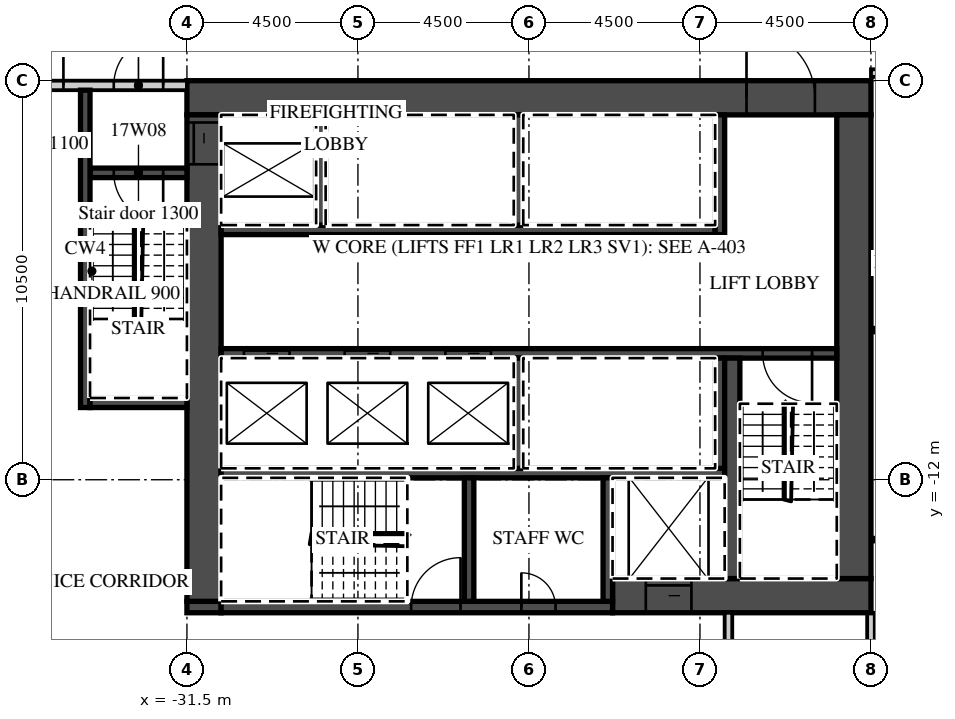
"""IFC4 building model, lengths in metres.
Left out: names, types, materials, properties, quantities, classifications, styles, units other than length and angle.
Written with IfcOpenShell. Run it as: python <this file> out.ifc"""

import sys

from ifc_helpers import new_model, si_unit, direction, frame, frame_2d, origin, place, context, subcontext, project, spatial, rectangle, extrude, element, fill, save


model = new_model("IFC4")
c1 = context("Model", 3, precision=1e-05, world=origin(), true_north=direction((0.0, 1.0)))
c2 = subcontext(c1, "Body", "Model", "MODEL_VIEW")
j1 = project(units=[si_unit("LENGTHUNIT", "METRE"), si_unit("PLANEANGLEUNIT", "RADIAN")], contexts=[c1])
p1 = place(None, origin())
s1 = spatial("IfcSite", under=j1, at=p1, CompositionType="ELEMENT")
p2 = place(p1, origin())
s2 = spatial("IfcBuilding", under=s1, at=p2, CompositionType="ELEMENT")
p3 = place(p2, frame((0.0, 0.0, 86.4)))
s3 = spatial("IfcBuildingStorey", under=s2, at=p3, CompositionType="ELEMENT", Elevation=86.4)
p4 = place(p3, frame((-13.5, -21.55, 0.0), z_axis=(0.0, 0.0, 1.0), x_axis=(0.0, 1.0, 0.0)))
e1 = element("IfcWall", 1, at=p4, inside=s3, PredefinedType="PARTITIONING", context=c2, shape_type="SweptSolid", body=[
    extrude(rectangle(XDim=6.05, YDim=0.2, at=frame_2d((3.025, 0.0))), origin(), (0.0, 0.0, 1.0), 3.02),
])
p5 = place(p3, frame((-13.5, -1.3, 0.0), z_axis=(0.0, 0.0, 1.0), x_axis=(1.0, 0.0, 0.0)))
e2 = element("IfcWall", 2, at=p5, inside=s3, PredefinedType="PARTITIONING", context=c2, shape_type="SweptSolid", body=[
    extrude(rectangle(XDim=58.05, YDim=0.2, at=frame_2d((29.025, 0.0))), origin(), (0.0, 0.0, 1.0), 3.02),
])
p6 = place(p5, frame((2.925, 0.0, 0.0)))
e3 = element("IfcOpeningElement", 3, at=p6, cuts=e2, PredefinedType="OPENING", context=c2, shape_type="SweptSolid", body=[
    extrude(rectangle(XDim=1.0, YDim=2.1, at=frame_2d((0.5, 1.05))), frame((0.0, 0.11, 0.0), z_axis=(0.0, -1.0, 0.0), x_axis=(1.0, 0.0, 0.0)), (0.0, 0.0, 1.0), 0.22),
])
p7 = place(p5, frame((5.075, 0.0, 0.0)))
e4 = element("IfcOpeningElement", 4, at=p7, cuts=e2, PredefinedType="OPENING", context=c2, shape_type="SweptSolid", body=[
    extrude(rectangle(XDim=1.0, YDim=2.1, at=frame_2d((0.5, 1.05))), frame((0.0, 0.11, 0.0), z_axis=(0.0, -1.0, 0.0), x_axis=(1.0, 0.0, 0.0)), (0.0, 0.0, 1.0), 0.22),
])
p8 = place(p5, frame((9.55, 0.0, 0.0)))
e5 = element("IfcOpeningElement", 5, at=p8, cuts=e2, PredefinedType="OPENING", context=c2, shape_type="SweptSolid", body=[
    extrude(rectangle(XDim=1.0, YDim=2.1, at=frame_2d((0.5, 1.05))), frame((0.0, 0.11, 0.0), z_axis=(0.0, -1.0, 0.0), x_axis=(1.0, 0.0, 0.0)), (0.0, 0.0, 1.0), 0.22),
])
p9 = place(p5, frame((14.075, 0.0, 0.0)))
e6 = element("IfcOpeningElement", 6, at=p9, cuts=e2, PredefinedType="OPENING", context=c2, shape_type="SweptSolid", body=[
    extrude(rectangle(XDim=1.0, YDim=2.1, at=frame_2d((0.5, 1.05))), frame((0.0, 0.11, 0.0), z_axis=(0.0, -1.0, 0.0), x_axis=(1.0, 0.0, 0.0)), (0.0, 0.0, 1.0), 0.22),
])
p10 = place(p5, frame((20.925, 0.0, 0.0)))
e7 = element("IfcOpeningElement", 7, at=p10, cuts=e2, PredefinedType="OPENING", context=c2, shape_type="SweptSolid", body=[
    extrude(rectangle(XDim=1.0, YDim=2.1, at=frame_2d((0.5, 1.05))), frame((0.0, 0.11, 0.0), z_axis=(0.0, -1.0, 0.0), x_axis=(1.0, 0.0, 0.0)), (0.0, 0.0, 1.0), 0.22),
])
p11 = place(p5, frame((27.862, 0.0, 0.0)))
e8 = element("IfcOpeningElement", 8, at=p11, cuts=e2, PredefinedType="OPENING", context=c2, shape_type="SweptSolid", body=[
    extrude(rectangle(XDim=1.2, YDim=2.1, at=frame_2d((0.6, 1.05))), frame((0.0, 0.11, 0.0), z_axis=(0.0, -1.0, 0.0), x_axis=(1.0, 0.0, 0.0)), (0.0, 0.0, 1.0), 0.22),
])
p12 = place(p5, frame((34.45, 0.0, 0.0)))
e9 = element("IfcOpeningElement", 9, at=p12, cuts=e2, PredefinedType="OPENING", context=c2, shape_type="SweptSolid", body=[
    extrude(rectangle(XDim=1.0, YDim=2.1, at=frame_2d((0.5, 1.05))), frame((0.0, 0.11, 0.0), z_axis=(0.0, -1.0, 0.0), x_axis=(1.0, 0.0, 0.0)), (0.0, 0.0, 1.0), 0.22),
])
p13 = place(p5, frame((38.925, 0.0, 0.0)))
e10 = element("IfcOpeningElement", 10, at=p13, cuts=e2, PredefinedType="OPENING", context=c2, shape_type="SweptSolid", body=[
    extrude(rectangle(XDim=1.0, YDim=2.1, at=frame_2d((0.5, 1.05))), frame((0.0, 0.11, 0.0), z_axis=(0.0, -1.0, 0.0), x_axis=(1.0, 0.0, 0.0)), (0.0, 0.0, 1.0), 0.22),
])
p14 = place(p5, frame((41.075, 0.0, 0.0)))
e11 = element("IfcOpeningElement", 11, at=p14, cuts=e2, PredefinedType="OPENING", context=c2, shape_type="SweptSolid", body=[
    extrude(rectangle(XDim=1.0, YDim=2.1, at=frame_2d((0.5, 1.05))), frame((0.0, 0.11, 0.0), z_axis=(0.0, -1.0, 0.0), x_axis=(1.0, 0.0, 0.0)), (0.0, 0.0, 1.0), 0.22),
])
p15 = place(p5, frame((45.55, 0.0, 0.0)))
e12 = element("IfcOpeningElement", 12, at=p15, cuts=e2, PredefinedType="OPENING", context=c2, shape_type="SweptSolid", body=[
    extrude(rectangle(XDim=1.0, YDim=2.1, at=frame_2d((0.5, 1.05))), frame((0.0, 0.11, 0.0), z_axis=(0.0, -1.0, 0.0), x_axis=(1.0, 0.0, 0.0)), (0.0, 0.0, 1.0), 0.22),
])
p16 = place(p5, frame((50.075, 0.0, 0.0)))
e13 = element("IfcOpeningElement", 13, at=p16, cuts=e2, PredefinedType="OPENING", context=c2, shape_type="SweptSolid", body=[
    extrude(rectangle(XDim=1.0, YDim=2.1, at=frame_2d((0.5, 1.05))), frame((0.0, 0.11, 0.0), z_axis=(0.0, -1.0, 0.0), x_axis=(1.0, 0.0, 0.0)), (0.0, 0.0, 1.0), 0.22),
])
p17 = place(p5, frame((56.525, 0.0, 0.0)))
e14 = element("IfcOpeningElement", 14, at=p17, cuts=e2, PredefinedType="OPENING", context=c2, shape_type="SweptSolid", body=[
    extrude(rectangle(XDim=1.0, YDim=2.1, at=frame_2d((0.5, 1.05))), frame((0.0, 0.11, 0.0), z_axis=(0.0, -1.0, 0.0), x_axis=(1.0, 0.0, 0.0)), (0.0, 0.0, 1.0), 0.22),
])
p18 = place(p3, frame((-31.5, -1.95, 0.0), z_axis=(0.0, 0.0, 1.0), x_axis=(1.0, 0.0, 0.0)))
e15 = element("IfcWall", 15, at=p18, inside=s3, PredefinedType="SHEAR", context=c2, shape_type="SweptSolid", body=[
    extrude(rectangle(XDim=18.0, YDim=0.9, at=frame_2d((9.0, 0.0))), origin(), (0.0, 0.0, 1.0), 3.02),
])
p19 = place(p18, frame((14.725, 0.0, 0.0)))
e16 = element("IfcOpeningElement", 16, at=p19, cuts=e15, PredefinedType="OPENING", context=c2, shape_type="SweptSolid", body=[
    extrude(rectangle(XDim=1.8, YDim=2.1, at=frame_2d((0.9, 1.05))), frame((0.0, 0.46, 0.0), z_axis=(0.0, -1.0, 0.0), x_axis=(1.0, 0.0, 0.0)), (0.0, 0.0, 1.0), 0.92),
])
p20 = place(p3, frame((-20.3, -15.05, 0.0), z_axis=(0.0, 0.0, 1.0), x_axis=(1.0, 0.0, 0.0)))
e17 = element("IfcWall", 17, at=p20, inside=s3, PredefinedType="SHEAR", context=c2, shape_type="SweptSolid", body=[
    extrude(rectangle(XDim=6.8, YDim=0.9, at=frame_2d((3.4, 0.0))), origin(), (0.0, 0.0, 1.0), 3.02),
])
p21 = place(p20, frame((0.875, 0.0, 0.0)))
e18 = element("IfcOpeningElement", 18, at=p21, cuts=e17, PredefinedType="OPENING", context=c2, shape_type="SweptSolid", body=[
    extrude(rectangle(XDim=1.2, YDim=2.1, at=frame_2d((0.6, 1.05))), frame((0.0, 0.46, 0.0), z_axis=(0.0, -1.0, 0.0), x_axis=(1.0, 0.0, 0.0)), (0.0, 0.0, 1.0), 0.92),
])
p22 = place(p3, frame((-31.5, -15.35, 0.0), z_axis=(0.0, 0.0, 1.0), x_axis=(1.0, 0.0, 0.0)))
e19 = element("IfcWall", 19, at=p22, inside=s3, PredefinedType="SHEAR", context=c2, shape_type="SweptSolid", body=[
    extrude(rectangle(XDim=0.9, YDim=0.3, at=frame_2d((0.45, 0.0))), origin(), (0.0, 0.0, 1.0), 3.02),
])
p23 = place(p3, frame((-30.6, -15.35, 0.0), z_axis=(0.0, 0.0, 1.0), x_axis=(1.0, 0.0, 0.0)))
e20 = element("IfcWall", 20, at=p23, inside=s3, PredefinedType="SHEAR", context=c2, shape_type="SweptSolid", body=[
    extrude(rectangle(XDim=10.3, YDim=0.3, at=frame_2d((5.15, 0.0))), origin(), (0.0, 0.0, 1.0), 3.02),
])
p24 = place(p23, frame((5.0, 0.0, 0.0)))
e21 = element("IfcOpeningElement", 21, at=p24, cuts=e20, PredefinedType="OPENING", context=c2, shape_type="SweptSolid", body=[
    extrude(rectangle(XDim=1.3, YDim=2.1, at=frame_2d((0.65, 1.05))), frame((0.0, 0.16, 0.0), z_axis=(0.0, -1.0, 0.0), x_axis=(1.0, 0.0, 0.0)), (0.0, 0.0, 1.0), 0.32),
])
p25 = place(p23, frame((7.9, 0.0, 0.0)))
e22 = element("IfcOpeningElement", 22, at=p25, cuts=e20, PredefinedType="OPENING", context=c2, shape_type="SweptSolid", body=[
    extrude(rectangle(XDim=0.9, YDim=2.1, at=frame_2d((0.45, 1.05))), frame((0.0, 0.16, 0.0), z_axis=(0.0, -1.0, 0.0), x_axis=(1.0, 0.0, 0.0)), (0.0, 0.0, 1.0), 0.32),
])
p26 = place(p3, frame((-31.05, -15.2, 0.0), z_axis=(0.0, 0.0, 1.0), x_axis=(0.0, 1.0, 0.0)))
e23 = element("IfcWall", 23, at=p26, inside=s3, PredefinedType="SHEAR", context=c2, shape_type="SweptSolid", body=[
    extrude(rectangle(XDim=12.8, YDim=0.9, at=frame_2d((6.4, 0.0))), origin(), (0.0, 0.0, 1.0), 3.02),
])
p27 = place(p26, frame((11.5, 0.0, 0.0)))
e24 = element("IfcOpeningElement", 24, at=p27, cuts=e23, PredefinedType="OPENING", context=c2, shape_type="SweptSolid", body=[
    extrude(rectangle(XDim=1.1, YDim=2.1, at=frame_2d((0.55, 1.05))), frame((0.0, 0.46, 0.0), z_axis=(0.0, -1.0, 0.0), x_axis=(1.0, 0.0, 0.0)), (0.0, 0.0, 1.0), 0.92),
])
p28 = place(p3, frame((-13.95, -14.6, 0.0), z_axis=(0.0, 0.0, 1.0), x_axis=(0.0, 1.0, 0.0)))
e25 = element("IfcWall", 25, at=p28, inside=s3, PredefinedType="SHEAR", context=c2, shape_type="SweptSolid", body=[
    extrude(rectangle(XDim=12.2, YDim=0.9, at=frame_2d((6.1, 0.0))), origin(), (0.0, 0.0, 1.0), 3.02),
])
p29 = place(p3, frame((-30.6, -5.425, 0.0), z_axis=(0.0, 0.0, 1.0), x_axis=(1.0, 0.0, 0.0)))
e26 = element("IfcWall", 26, at=p29, inside=s3, PredefinedType="SHEAR", context=c2, shape_type="SweptSolid", body=[
    extrude(rectangle(XDim=13.0, YDim=0.25, at=frame_2d((6.5, 0.0))), origin(), (0.0, 0.0, 1.0), 3.02),
])
p30 = place(p3, frame((-17.475, -5.55, 0.0), z_axis=(0.0, 0.0, 1.0), x_axis=(0.0, 1.0, 0.0)))
e27 = element("IfcWall", 27, at=p30, inside=s3, PredefinedType="SHEAR", context=c2, shape_type="SweptSolid", body=[
    extrude(rectangle(XDim=3.15, YDim=0.25, at=frame_2d((1.575, 0.0))), origin(), (0.0, 0.0, 1.0), 3.02),
])
for number, where, z_axis, x_axis in (
    (28, (-27.975, -5.3, 0.0), (0.0, 0.0, 1.0), (0.0, 1.0, 0.0)),
    (29, (-22.775, -5.3, 0.0), (0.0, 0.0, 1.0), (0.0, 1.0, 0.0)),
):
    element("IfcWall", number, at=place(p3, frame(where, z_axis=z_axis, x_axis=x_axis)), inside=s3, PredefinedType="SHEAR", context=c2, shape_type="SweptSolid", body=[
        extrude(rectangle(XDim=2.9, YDim=0.25, at=frame_2d((1.45, 0.0))), origin(), (0.0, 0.0, 1.0), 3.02),
    ])
p31 = place(p3, frame((-30.6, -8.675, 0.0), z_axis=(0.0, 0.0, 1.0), x_axis=(1.0, 0.0, 0.0)))
e30 = element("IfcWall", 30, at=p31, inside=s3, PredefinedType="SHEAR", context=c2, shape_type="SweptSolid", body=[
    extrude(rectangle(XDim=16.2, YDim=0.25, at=frame_2d((8.1, 0.0))), origin(), (0.0, 0.0, 1.0), 3.02),
])
p32 = place(p31, frame((0.6, 0.0, 0.0)))
e31 = element("IfcOpeningElement", 31, at=p32, cuts=e30, PredefinedType="OPENING", context=c2, shape_type="SweptSolid", body=[
    extrude(rectangle(XDim=1.2, YDim=2.1, at=frame_2d((0.6, 1.05))), frame((0.0, 0.135, 0.0), z_axis=(0.0, -1.0, 0.0), x_axis=(1.0, 0.0, 0.0)), (0.0, 0.0, 1.0), 0.27),
])
p33 = place(p31, frame((3.25, 0.0, 0.0)))
e32 = element("IfcOpeningElement", 32, at=p33, cuts=e30, PredefinedType="OPENING", context=c2, shape_type="SweptSolid", body=[
    extrude(rectangle(XDim=1.2, YDim=2.1, at=frame_2d((0.6, 1.05))), frame((0.0, 0.135, 0.0), z_axis=(0.0, -1.0, 0.0), x_axis=(1.0, 0.0, 0.0)), (0.0, 0.0, 1.0), 0.27),
])
p34 = place(p31, frame((5.9, 0.0, 0.0)))
e33 = element("IfcOpeningElement", 33, at=p34, cuts=e30, PredefinedType="OPENING", context=c2, shape_type="SweptSolid", body=[
    extrude(rectangle(XDim=1.2, YDim=2.1, at=frame_2d((0.6, 1.05))), frame((0.0, 0.135, 0.0), z_axis=(0.0, -1.0, 0.0), x_axis=(1.0, 0.0, 0.0)), (0.0, 0.0, 1.0), 0.27),
])
p35 = place(p31, frame((14.25, 0.0, 0.0)))
e34 = element("IfcOpeningElement", 34, at=p35, cuts=e30, PredefinedType="OPENING", context=c2, shape_type="SweptSolid", body=[
    extrude(rectangle(XDim=1.3, YDim=2.1, at=frame_2d((0.65, 1.05))), frame((0.0, 0.135, 0.0), z_axis=(0.0, -1.0, 0.0), x_axis=(1.0, 0.0, 0.0)), (0.0, 0.0, 1.0), 0.27),
])
p36 = place(p3, frame((-30.6, -11.825, 0.0), z_axis=(0.0, 0.0, 1.0), x_axis=(1.0, 0.0, 0.0)))
e35 = element("IfcWall", 35, at=p36, inside=s3, PredefinedType="SHEAR", context=c2, shape_type="SweptSolid", body=[
    extrude(rectangle(XDim=13.25, YDim=0.25, at=frame_2d((6.625, 0.0))), origin(), (0.0, 0.0, 1.0), 3.02),
])
for number, where, z_axis, x_axis in (
    (36, (-17.475, -11.7, 0.0), (0.0, 0.0, 1.0), (0.0, 1.0, 0.0)),
    (37, (-22.775, -11.7, 0.0), (0.0, 0.0, 1.0), (0.0, 1.0, 0.0)),
):
    element("IfcWall", number, at=place(p3, frame(where, z_axis=z_axis, x_axis=x_axis)), inside=s3, PredefinedType="SHEAR", context=c2, shape_type="SweptSolid", body=[
        extrude(rectangle(XDim=2.9, YDim=0.25, at=frame_2d((1.45, 0.0))), origin(), (0.0, 0.0, 1.0), 3.02),
    ])
p37 = place(p3, frame((-17.15, -14.6, 0.0), z_axis=(0.0, 0.0, 1.0), x_axis=(0.0, 1.0, 0.0)))
e38 = element("IfcWall", 38, at=p37, inside=s3, PredefinedType="SHEAR", context=c2, shape_type="SweptSolid", body=[
    extrude(rectangle(XDim=5.8, YDim=0.4, at=frame_2d((2.9, 0.0))), origin(), (0.0, 0.0, 1.0), 3.02),
])
for number, where, z_axis, x_axis in (
    (39, (-20.425, -15.2, 0.0), (0.0, 0.0, 1.0), (0.0, 1.0, 0.0)),
    (40, (-24.075, -15.2, 0.0), (0.0, 0.0, 1.0), (0.0, 1.0, 0.0)),
):
    element("IfcWall", number, at=place(p3, frame(where, z_axis=z_axis, x_axis=x_axis)), inside=s3, PredefinedType="SHEAR", context=c2, shape_type="SweptSolid", body=[
        extrude(rectangle(XDim=3.25, YDim=0.25, at=frame_2d((1.625, 0.0))), origin(), (0.0, 0.0, 1.0), 3.02),
    ])
p38 = place(p3, frame((-44.55, -1.625, 0.0), z_axis=(0.0, 0.0, 1.0), x_axis=(1.0, 0.0, 0.0)))
e41 = element("IfcWall", 41, at=p38, inside=s3, PredefinedType="PARTITIONING", context=c2, shape_type="SweptSolid", body=[
    extrude(rectangle(XDim=13.05, YDim=0.25, at=frame_2d((6.525, 0.0))), origin(), (0.0, 0.0, 1.0), 3.02),
])
p39 = place(p38, frame((11.125, 0.0, 0.0)))
e42 = element("IfcOpeningElement", 42, at=p39, cuts=e41, PredefinedType="OPENING", context=c2, shape_type="SweptSolid", body=[
    extrude(rectangle(XDim=1.3, YDim=2.1, at=frame_2d((0.65, 1.05))), frame((0.0, 0.135, 0.0), z_axis=(0.0, -1.0, 0.0), x_axis=(1.0, 0.0, 0.0)), (0.0, 0.0, 1.0), 0.27),
])
p40 = place(p38, frame((8.7, 0.0, 0.0)))
e43 = element("IfcOpeningElement", 43, at=p40, cuts=e41, PredefinedType="OPENING", context=c2, shape_type="SweptSolid", body=[
    extrude(rectangle(XDim=1.1, YDim=2.1, at=frame_2d((0.55, 1.05))), frame((0.0, 0.135, 0.0), z_axis=(0.0, -1.0, 0.0), x_axis=(1.0, 0.0, 0.0)), (0.0, 0.0, 1.0), 0.27),
])
p41 = place(p3, frame((-34.05, -3.925, 0.0), z_axis=(0.0, 0.0, 1.0), x_axis=(1.0, 0.0, 0.0)))
e44 = element("IfcWall", 44, at=p41, inside=s3, PredefinedType="SHEAR", context=c2, shape_type="SweptSolid", body=[
    extrude(rectangle(XDim=2.55, YDim=0.25, at=frame_2d((1.275, 0.0))), origin(), (0.0, 0.0, 1.0), 3.02),
])
p42 = place(p41, frame((0.625, 0.0, 0.0)))
e45 = element("IfcOpeningElement", 45, at=p42, cuts=e44, PredefinedType="OPENING", context=c2, shape_type="SweptSolid", body=[
    extrude(rectangle(XDim=1.3, YDim=2.1, at=frame_2d((0.65, 1.05))), frame((0.0, 0.135, 0.0), z_axis=(0.0, -1.0, 0.0), x_axis=(1.0, 0.0, 0.0)), (0.0, 0.0, 1.0), 0.27),
])
p43 = place(p3, frame((-34.175, -10.1, 0.0), z_axis=(0.0, 0.0, 1.0), x_axis=(0.0, 1.0, 0.0)))
e46 = element("IfcWall", 46, at=p43, inside=s3, PredefinedType="SHEAR", context=c2, shape_type="SweptSolid", body=[
    extrude(rectangle(XDim=8.35, YDim=0.25, at=frame_2d((4.175, 0.0))), origin(), (0.0, 0.0, 1.0), 3.02),
])
p44 = place(p3, frame((-34.05, -9.975, 0.0), z_axis=(0.0, 0.0, 1.0), x_axis=(1.0, 0.0, 0.0)))
e47 = element("IfcWall", 47, at=p44, inside=s3, PredefinedType="SHEAR", context=c2, shape_type="SweptSolid", body=[
    extrude(rectangle(XDim=2.55, YDim=0.25, at=frame_2d((1.275, 0.0))), origin(), (0.0, 0.0, 1.0), 3.02),
])
p45 = place(p3, frame((-17.25, -17.7, 0.0), z_axis=(0.0, 0.0, 1.0), x_axis=(0.0, 1.0, 0.0)))
e48 = element("IfcWall", 48, at=p45, inside=s3, PredefinedType="PARTITIONING", context=c2, shape_type="SweptSolid", body=[
    extrude(rectangle(XDim=2.2, YDim=0.2, at=frame_2d((1.1, 0.0))), origin(), (0.0, 0.0, 1.0), 3.02),
])
p46 = place(p32, origin())
e49 = element("IfcDoor", 49, at=p46, inside=s3, OperationType="SLIDING_TO_LEFT", PredefinedType="DOOR", context=c2, shape_type="SweptSolid", body=[
    extrude(rectangle(XDim=1.2, YDim=2.1, at=frame_2d((0.6, 1.05))), frame((0.0, 0.025, 0.0), z_axis=(0.0, -1.0, 0.0), x_axis=(1.0, 0.0, 0.0)), (0.0, 0.0, 1.0), 0.05),
])
fill(e31, e49)
p47 = place(p33, origin())
e50 = element("IfcDoor", 50, at=p47, inside=s3, OperationType="SLIDING_TO_RIGHT", PredefinedType="DOOR", context=c2, shape_type="SweptSolid", body=[
    extrude(rectangle(XDim=1.2, YDim=2.1, at=frame_2d((0.6, 1.05))), frame((0.0, 0.025, 0.0), z_axis=(0.0, -1.0, 0.0), x_axis=(1.0, 0.0, 0.0)), (0.0, 0.0, 1.0), 0.05),
])
fill(e32, e50)
p48 = place(p34, origin())
e51 = element("IfcDoor", 51, at=p48, inside=s3, OperationType="SLIDING_TO_RIGHT", PredefinedType="DOOR", context=c2, shape_type="SweptSolid", body=[
    extrude(rectangle(XDim=1.2, YDim=2.1, at=frame_2d((0.6, 1.05))), frame((0.0, 0.025, 0.0), z_axis=(0.0, -1.0, 0.0), x_axis=(1.0, 0.0, 0.0)), (0.0, 0.0, 1.0), 0.05),
])
fill(e33, e51)
p49 = place(p21, origin())
e52 = element("IfcDoor", 52, at=p49, inside=s3, OperationType="SLIDING_TO_LEFT", PredefinedType="DOOR", context=c2, shape_type="SweptSolid", body=[
    extrude(rectangle(XDim=1.2, YDim=2.1, at=frame_2d((0.6, 1.05))), frame((0.0, 0.025, 0.0), z_axis=(0.0, -1.0, 0.0), x_axis=(1.0, 0.0, 0.0)), (0.0, 0.0, 1.0), 0.05),
])
fill(e18, e52)
p50 = place(p27, origin())
e53 = element("IfcDoor", 53, at=p50, inside=s3, OperationType="SLIDING_TO_RIGHT", PredefinedType="DOOR", context=c2, shape_type="SweptSolid", body=[
    extrude(rectangle(XDim=1.1, YDim=2.1, at=frame_2d((0.55, 1.05))), frame((0.0, 0.025, 0.0), z_axis=(0.0, -1.0, 0.0), x_axis=(1.0, 0.0, 0.0)), (0.0, 0.0, 1.0), 0.05),
])
fill(e24, e53)
p51 = place(p19, origin())
e54 = element("IfcDoor", 54, at=p51, inside=s3, OperationType="DOUBLE_DOOR_DOUBLE_SWING", PredefinedType="DOOR", context=c2, shape_type="SweptSolid", body=[
    extrude(rectangle(XDim=1.8, YDim=2.1, at=frame_2d((0.9, 1.05))), frame((0.0, 0.025, 0.0), z_axis=(0.0, -1.0, 0.0), x_axis=(1.0, 0.0, 0.0)), (0.0, 0.0, 1.0), 0.05),
])
fill(e16, e54)
p52 = place(p39, origin())
e55 = element("IfcDoor", 55, at=p52, inside=s3, OperationType="SINGLE_SWING_RIGHT", PredefinedType="DOOR", context=c2, shape_type="SweptSolid", body=[
    extrude(rectangle(XDim=1.3, YDim=2.1, at=frame_2d((0.65, 1.05))), frame((0.0, 0.025, 0.0), z_axis=(0.0, -1.0, 0.0), x_axis=(1.0, 0.0, 0.0)), (0.0, 0.0, 1.0), 0.05),
])
fill(e42, e55)
p53 = place(p42, origin())
e56 = element("IfcDoor", 56, at=p53, inside=s3, OperationType="SINGLE_SWING_RIGHT", PredefinedType="DOOR", context=c2, shape_type="SweptSolid", body=[
    extrude(rectangle(XDim=1.3, YDim=2.1, at=frame_2d((0.65, 1.05))), frame((0.0, 0.025, 0.0), z_axis=(0.0, -1.0, 0.0), x_axis=(1.0, 0.0, 0.0)), (0.0, 0.0, 1.0), 0.05),
])
fill(e45, e56)
p54 = place(p40, origin())
e57 = element("IfcDoor", 57, at=p54, inside=s3, OperationType="SINGLE_SWING_RIGHT", PredefinedType="DOOR", context=c2, shape_type="SweptSolid", body=[
    extrude(rectangle(XDim=1.1, YDim=2.1, at=frame_2d((0.55, 1.05))), frame((0.0, 0.025, 0.0), z_axis=(0.0, -1.0, 0.0), x_axis=(1.0, 0.0, 0.0)), (0.0, 0.0, 1.0), 0.05),
])
fill(e43, e57)
p55 = place(p35, origin())
e58 = element("IfcDoor", 58, at=p55, inside=s3, OperationType="SINGLE_SWING_RIGHT", PredefinedType="DOOR", context=c2, shape_type="SweptSolid", body=[
    extrude(rectangle(XDim=1.3, YDim=2.1, at=frame_2d((0.65, 1.05))), frame((0.0, 0.025, 0.0), z_axis=(0.0, -1.0, 0.0), x_axis=(1.0, 0.0, 0.0)), (0.0, 0.0, 1.0), 0.05),
])
fill(e34, e58)
p56 = place(p24, origin())
e59 = element("IfcDoor", 59, at=p56, inside=s3, OperationType="SINGLE_SWING_RIGHT", PredefinedType="DOOR", context=c2, shape_type="SweptSolid", body=[
    extrude(rectangle(XDim=1.3, YDim=2.1, at=frame_2d((0.65, 1.05))), frame((0.0, 0.025, 0.0), z_axis=(0.0, -1.0, 0.0), x_axis=(1.0, 0.0, 0.0)), (0.0, 0.0, 1.0), 0.05),
])
fill(e21, e59)
p57 = place(p25, origin())
e60 = element("IfcDoor", 60, at=p57, inside=s3, OperationType="SINGLE_SWING_LEFT", PredefinedType="DOOR", context=c2, shape_type="SweptSolid", body=[
    extrude(rectangle(XDim=0.9, YDim=2.1, at=frame_2d((0.45, 1.05))), frame((0.0, 0.025, 0.0), z_axis=(0.0, -1.0, 0.0), x_axis=(1.0, 0.0, 0.0)), (0.0, 0.0, 1.0), 0.05),
])
fill(e22, e60)
save(model, sys.argv[1])
